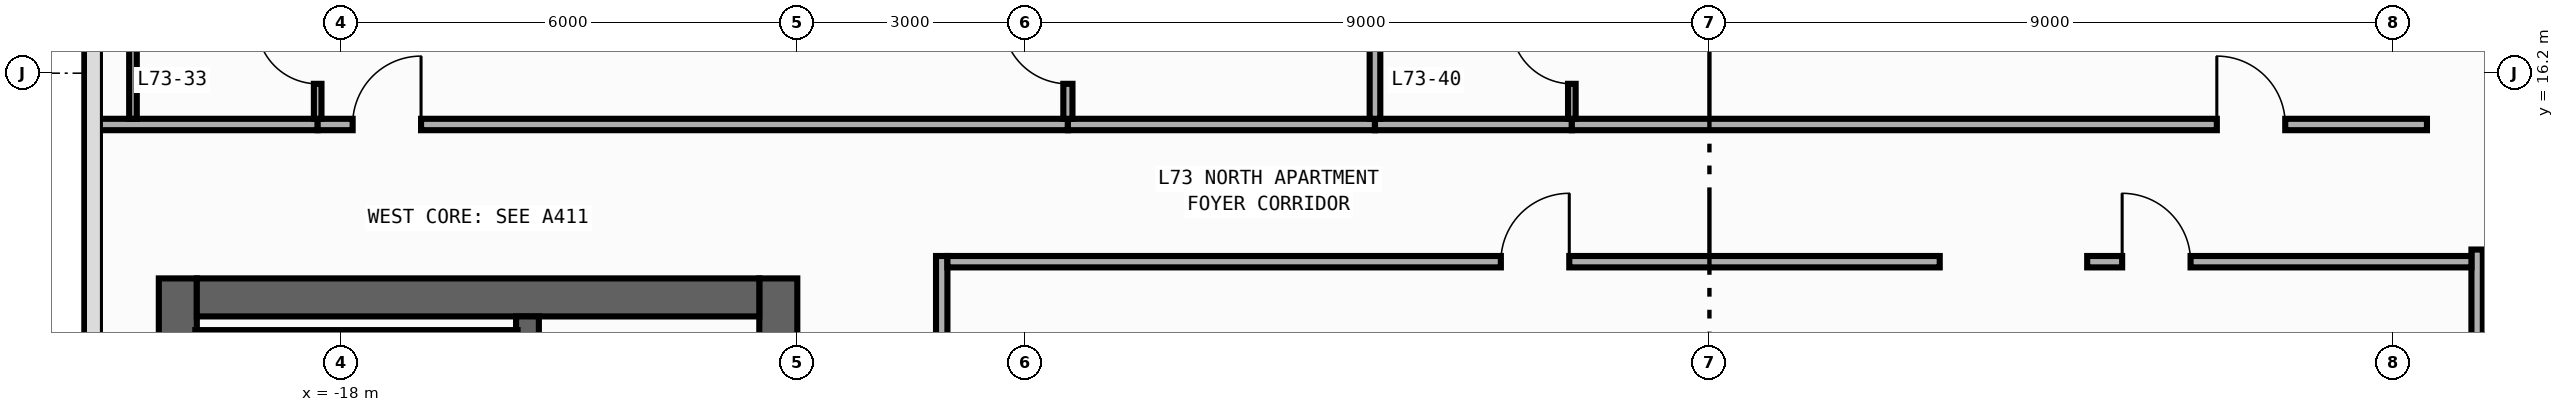
"""IFC4 building model, lengths in metres.
Left out: names, types, materials, properties, quantities, classifications, styles, units other than length and angle.
Written with IfcOpenShell. Run it as: python <this file> out.ifc"""

import sys

from ifc_helpers import new_model, si_unit, direction, frame, frame_2d, origin, place, context, subcontext, project, spatial, rectangle, extrude, element, fill, save


model = new_model("IFC4")
c1 = context("Model", 3, precision=1e-05, world=origin(), true_north=direction((0.0, 1.0)))
c2 = subcontext(c1, "Body", "Model", "MODEL_VIEW")
j1 = project(units=[si_unit("LENGTHUNIT", "METRE"), si_unit("PLANEANGLEUNIT", "RADIAN")], contexts=[c1])
p1 = place(None, origin())
s1 = spatial("IfcSite", under=j1, at=p1, CompositionType="ELEMENT")
p2 = place(p1, origin())
s2 = spatial("IfcBuilding", under=s1, at=p2, CompositionType="ELEMENT")
p3 = place(p2, frame((0.0, 0.0, 304.2)))
s3 = spatial("IfcBuildingStorey", under=s2, at=p3, CompositionType="ELEMENT", Elevation=304.2)
p4 = place(p3, frame((-20.15, -13.5, 0.0), z_axis=(0.0, 0.0, 1.0), x_axis=(0.0, 1.0, 0.0)))
e1 = element("IfcWall", 1, at=p4, inside=s3, PredefinedType="SHEAR", context=c2, shape_type="SweptSolid", body=[
    extrude(rectangle(XDim=27.0, YDim=0.5, at=frame_2d((13.5, 0.0))), origin(), (0.0, 0.0, 1.0), 3.54),
])
p5 = place(p3, frame((-12.25, -13.5, 0.0), z_axis=(0.0, 0.0, 1.0), x_axis=(0.0, 1.0, 0.0)))
e2 = element("IfcWall", 2, at=p5, inside=s3, PredefinedType="SHEAR", context=c2, shape_type="SweptSolid", body=[
    extrude(rectangle(XDim=27.0, YDim=0.5, at=frame_2d((13.5, 0.0))), origin(), (0.0, 0.0, 1.0), 3.54),
])
p6 = place(p5, frame((15.175, 0.0, 0.0)))
e3 = element("IfcOpeningElement", 3, at=p6, cuts=e2, PredefinedType="OPENING", context=c2, shape_type="SweptSolid", body=[
    extrude(rectangle(XDim=0.85, YDim=2.1, at=frame_2d((0.425, 1.05))), frame((0.0, 0.26, 0.0), z_axis=(0.0, -1.0, 0.0), x_axis=(1.0, 0.0, 0.0)), (0.0, 0.0, 1.0), 0.52),
])
p7 = place(p5, frame((21.275, 0.0, 0.0)))
e4 = element("IfcOpeningElement", 4, at=p7, cuts=e2, PredefinedType="OPENING", context=c2, shape_type="SweptSolid", body=[
    extrude(rectangle(XDim=0.85, YDim=2.1, at=frame_2d((0.425, 1.05))), frame((0.0, 0.26, 0.0), z_axis=(0.0, -1.0, 0.0), x_axis=(1.0, 0.0, 0.0)), (0.0, 0.0, 1.0), 0.52),
])
p8 = place(p5, frame((4.275, 0.0, 0.0)))
e5 = element("IfcOpeningElement", 5, at=p8, cuts=e2, PredefinedType="OPENING", context=c2, shape_type="SweptSolid", body=[
    extrude(rectangle(XDim=0.85, YDim=2.1, at=frame_2d((0.425, 1.05))), frame((0.0, 0.26, 0.0), z_axis=(0.0, -1.0, 0.0), x_axis=(1.0, 0.0, 0.0)), (0.0, 0.0, 1.0), 0.52),
])
p9 = place(p5, frame((10.275, 0.0, 0.0)))
e6 = element("IfcOpeningElement", 6, at=p9, cuts=e2, PredefinedType="OPENING", context=c2, shape_type="SweptSolid", body=[
    extrude(rectangle(XDim=0.85, YDim=2.1, at=frame_2d((0.425, 1.05))), frame((0.0, 0.26, 0.0), z_axis=(0.0, -1.0, 0.0), x_axis=(1.0, 0.0, 0.0)), (0.0, 0.0, 1.0), 0.52),
])
p10 = place(p5, frame((12.725, 0.0, 0.0)))
e7 = element("IfcOpeningElement", 7, at=p10, cuts=e2, PredefinedType="OPENING", context=c2, shape_type="SweptSolid", body=[
    extrude(rectangle(XDim=1.15, YDim=2.2, at=frame_2d((0.575, 1.1))), frame((0.0, 0.26, 0.0), z_axis=(0.0, -1.0, 0.0), x_axis=(1.0, 0.0, 0.0)), (0.0, 0.0, 1.0), 0.52),
])
p11 = place(p5, frame((1.625, 0.0, 0.0)))
e8 = element("IfcOpeningElement", 8, at=p11, cuts=e2, PredefinedType="OPENING", context=c2, shape_type="SweptSolid", body=[
    extrude(rectangle(XDim=0.85, YDim=2.1, at=frame_2d((0.425, 1.05))), frame((0.0, 0.26, 0.0), z_axis=(0.0, -1.0, 0.0), x_axis=(1.0, 0.0, 0.0)), (0.0, 0.0, 1.0), 0.52),
])
p12 = place(p3, frame((-19.9, 13.25, 0.0), z_axis=(0.0, 0.0, 1.0), x_axis=(1.0, 0.0, 0.0)))
e9 = element("IfcWall", 9, at=p12, inside=s3, PredefinedType="SHEAR", context=c2, shape_type="SweptSolid", body=[
    extrude(rectangle(XDim=7.4, YDim=0.5, at=frame_2d((3.7, 0.0))), origin(), (0.0, 0.0, 1.0), 3.54),
])
p13 = place(p3, frame((-15.55, -13.0, 0.0), z_axis=(0.0, 0.0, 1.0), x_axis=(0.0, 1.0, 0.0)))
e10 = element("IfcWall", 10, at=p13, inside=s3, PredefinedType="SHEAR", context=c2, shape_type="SweptSolid", body=[
    extrude(rectangle(XDim=26.0, YDim=0.3, at=frame_2d((13.0, 0.0))), origin(), (0.0, 0.0, 1.0), 3.54),
])
p14 = place(p13, frame((12.225, 0.0, 0.0)))
e11 = element("IfcOpeningElement", 11, at=p14, cuts=e10, PredefinedType="OPENING", context=c2, shape_type="SweptSolid", body=[
    extrude(rectangle(XDim=1.15, YDim=2.2, at=frame_2d((0.575, 1.1))), frame((0.0, 0.16, 0.0), z_axis=(0.0, -1.0, 0.0), x_axis=(1.0, 0.0, 0.0)), (0.0, 0.0, 1.0), 0.32),
])
p15 = place(p13, frame((1.125, 0.0, 0.0)))
e12 = element("IfcOpeningElement", 12, at=p15, cuts=e10, PredefinedType="OPENING", context=c2, shape_type="SweptSolid", body=[
    extrude(rectangle(XDim=0.85, YDim=2.1, at=frame_2d((0.425, 1.05))), frame((0.0, 0.16, 0.0), z_axis=(0.0, -1.0, 0.0), x_axis=(1.0, 0.0, 0.0)), (0.0, 0.0, 1.0), 0.32),
])
p16 = place(p3, frame((-19.92, 12.71, 0.0), z_axis=(0.0, 0.0, 1.0), x_axis=(1.0, 0.0, 0.0)))
e13 = element("IfcWall", 13, at=p16, inside=s3, PredefinedType="SHEAR", context=c2, shape_type="SweptSolid", body=[
    extrude(rectangle(XDim=4.24, YDim=0.22, at=frame_2d((2.12, 0.0))), origin(), (0.0, 0.0, 1.0), 3.54),
])
p17 = place(p3, frame((-10.1, 4.79, 0.0), z_axis=(0.0, 0.0, 1.0), x_axis=(0.0, 1.0, 0.0)))
e14 = element("IfcWall", 14, at=p17, inside=s3, PredefinedType="PARTITIONING", context=c2, shape_type="SweptSolid", body=[
    extrude(rectangle(XDim=9.005, YDim=0.15, at=frame_2d((4.502, 0.0))), origin(), (0.0, 0.0, 1.0), 3.54),
])
p18 = place(p17, frame((0.46, 0.0, 0.0)))
e15 = element("IfcOpeningElement", 15, at=p18, cuts=e14, PredefinedType="OPENING", context=c2, shape_type="SweptSolid", body=[
    extrude(rectangle(XDim=0.9, YDim=2.15, at=frame_2d((0.45, 1.075))), frame((0.0, 0.085, 0.0), z_axis=(0.0, -1.0, 0.0), x_axis=(1.0, 0.0, 0.0)), (0.0, 0.0, 1.0), 0.17),
])
p19 = place(p3, frame((10.1, 4.79, 0.0), z_axis=(0.0, 0.0, 1.0), x_axis=(0.0, 1.0, 0.0)))
e16 = element("IfcWall", 16, at=p19, inside=s3, PredefinedType="PARTITIONING", context=c2, shape_type="SweptSolid", body=[
    extrude(rectangle(XDim=9.09, YDim=0.15, at=frame_2d((4.545, 0.0))), origin(), (0.0, 0.0, 1.0), 3.54),
])
p20 = place(p19, frame((0.46, 0.0, 0.0)))
e17 = element("IfcOpeningElement", 17, at=p20, cuts=e16, PredefinedType="OPENING", context=c2, shape_type="SweptSolid", body=[
    extrude(rectangle(XDim=0.9, YDim=2.15, at=frame_2d((0.45, 1.075))), frame((0.0, 0.085, 0.0), z_axis=(0.0, -1.0, 0.0), x_axis=(1.0, 0.0, 0.0)), (0.0, 0.0, 1.0), 0.17),
])
p21 = place(p3, frame((-21.255, 15.525, 0.0), z_axis=(0.0, 0.0, 1.0), x_axis=(1.0, 0.0, 0.0)))
e18 = element("IfcWall", 18, at=p21, inside=s3, PredefinedType="PARTITIONING", context=c2, shape_type="SweptSolid", body=[
    extrude(rectangle(XDim=2.945, YDim=0.15, at=frame_2d((1.472, 0.0))), origin(), (0.0, 0.0, 1.0), 3.54),
])
p22 = place(p3, frame((-18.31, 15.525, 0.0), z_axis=(0.0, 0.0, 1.0), x_axis=(1.0, 0.0, 0.0)))
e19 = element("IfcWall", 19, at=p22, inside=s3, PredefinedType="PARTITIONING", context=c2, shape_type="SweptSolid", body=[
    extrude(rectangle(XDim=9.87, YDim=0.15, at=frame_2d((4.935, 0.0))), origin(), (0.0, 0.0, 1.0), 3.54),
])
p23 = place(p22, frame((0.46, 0.0, 0.0)))
e20 = element("IfcOpeningElement", 20, at=p23, cuts=e19, PredefinedType="OPENING", context=c2, shape_type="SweptSolid", body=[
    extrude(rectangle(XDim=0.9, YDim=2.15, at=frame_2d((0.45, 1.075))), frame((0.0, 0.085, 0.0), z_axis=(0.0, -1.0, 0.0), x_axis=(1.0, 0.0, 0.0)), (0.0, 0.0, 1.0), 0.17),
])
p24 = place(p3, frame((-8.44, 15.525, 0.0), z_axis=(0.0, 0.0, 1.0), x_axis=(1.0, 0.0, 0.0)))
e21 = element("IfcWall", 21, at=p24, inside=s3, PredefinedType="PARTITIONING", context=c2, shape_type="SweptSolid", body=[
    extrude(rectangle(XDim=4.04, YDim=0.15, at=frame_2d((2.02, 0.0))), origin(), (0.0, 0.0, 1.0), 3.54),
])
p25 = place(p3, frame((-4.4, 15.525, 0.0), z_axis=(0.0, 0.0, 1.0), x_axis=(1.0, 0.0, 0.0)))
e22 = element("IfcWall", 22, at=p25, inside=s3, PredefinedType="PARTITIONING", context=c2, shape_type="SweptSolid", body=[
    extrude(rectangle(XDim=2.59, YDim=0.15, at=frame_2d((1.295, 0.0))), origin(), (0.0, 0.0, 1.0), 3.54),
])
p26 = place(p3, frame((-1.81, 15.525, 0.0), z_axis=(0.0, 0.0, 1.0), x_axis=(1.0, 0.0, 0.0)))
e23 = element("IfcWall", 23, at=p26, inside=s3, PredefinedType="PARTITIONING", context=c2, shape_type="SweptSolid", body=[
    extrude(rectangle(XDim=11.25, YDim=0.15, at=frame_2d((5.625, 0.0))), origin(), (0.0, 0.0, 1.0), 3.54),
])
p27 = place(p26, frame((8.486, 0.0, 0.0)))
e24 = element("IfcOpeningElement", 24, at=p27, cuts=e23, PredefinedType="OPENING", context=c2, shape_type="SweptSolid", body=[
    extrude(rectangle(XDim=0.9, YDim=2.15, at=frame_2d((0.45, 1.075))), frame((0.0, 0.085, 0.0), z_axis=(0.0, -1.0, 0.0), x_axis=(1.0, 0.0, 0.0)), (0.0, 0.0, 1.0), 0.17),
])
p28 = place(p3, frame((-10.025, 13.72, 0.0), z_axis=(0.0, 0.0, 1.0), x_axis=(1.0, 0.0, 0.0)))
e25 = element("IfcWall", 25, at=p28, inside=s3, PredefinedType="PARTITIONING", context=c2, shape_type="SweptSolid", body=[
    extrude(rectangle(XDim=13.055, YDim=0.15, at=frame_2d((6.527, 0.0))), origin(), (0.0, 0.0, 1.0), 3.54),
])
p29 = place(p28, frame((7.281, 0.0, 0.0)))
e26 = element("IfcOpeningElement", 26, at=p29, cuts=e25, PredefinedType="OPENING", context=c2, shape_type="SweptSolid", body=[
    extrude(rectangle(XDim=0.9, YDim=2.15, at=frame_2d((0.45, 1.075))), frame((0.0, 0.085, 0.0), z_axis=(0.0, -1.0, 0.0), x_axis=(1.0, 0.0, 0.0)), (0.0, 0.0, 1.0), 0.17),
])
p30 = place(p3, frame((4.97, 13.72, 0.0), z_axis=(0.0, 0.0, 1.0), x_axis=(1.0, 0.0, 0.0)))
e27 = element("IfcWall", 27, at=p30, inside=s3, PredefinedType="PARTITIONING", context=c2, shape_type="SweptSolid", body=[
    extrude(rectangle(XDim=5.055, YDim=0.15, at=frame_2d((2.527, 0.0))), origin(), (0.0, 0.0, 1.0), 3.54),
])
p31 = place(p30, frame((0.46, 0.0, 0.0)))
e28 = element("IfcOpeningElement", 28, at=p31, cuts=e27, PredefinedType="OPENING", context=c2, shape_type="SweptSolid", body=[
    extrude(rectangle(XDim=0.9, YDim=2.15, at=frame_2d((0.45, 1.075))), frame((0.0, 0.085, 0.0), z_axis=(0.0, -1.0, 0.0), x_axis=(1.0, 0.0, 0.0)), (0.0, 0.0, 1.0), 0.17),
])
p32 = place(p3, frame((-18.31, 15.6, 0.0), z_axis=(0.0, 0.0, 1.0), x_axis=(0.0, 1.0, 0.0)))
e29 = element("IfcWall", 29, at=p32, inside=s3, PredefinedType="PARTITIONING", context=c2, shape_type="SweptSolid", body=[
    extrude(rectangle(XDim=2.5, YDim=0.1, at=frame_2d((1.25, 0.0))), origin(), (0.0, 0.0, 1.0), 3.54),
])
p33 = place(p32, frame((0.46, 0.0, 0.0)))
e30 = element("IfcOpeningElement", 30, at=p33, cuts=e29, PredefinedType="OPENING", context=c2, shape_type="SweptSolid", body=[
    extrude(rectangle(XDim=0.8, YDim=2.1, at=frame_2d((0.4, 1.05))), frame((0.0, 0.06, 0.0), z_axis=(0.0, -1.0, 0.0), x_axis=(1.0, 0.0, 0.0)), (0.0, 0.0, 1.0), 0.12),
])
p34 = place(p3, frame((-8.44, 15.6, 0.0), z_axis=(0.0, 0.0, 1.0), x_axis=(0.0, 1.0, 0.0)))
e31 = element("IfcWall", 31, at=p34, inside=s3, PredefinedType="PARTITIONING", context=c2, shape_type="SweptSolid", body=[
    extrude(rectangle(XDim=4.5, YDim=0.12, at=frame_2d((2.25, 0.0))), origin(), (0.0, 0.0, 1.0), 3.54),
])
p35 = place(p34, frame((0.46, 0.0, 0.0)))
e32 = element("IfcOpeningElement", 32, at=p35, cuts=e31, PredefinedType="OPENING", context=c2, shape_type="SweptSolid", body=[
    extrude(rectangle(XDim=0.86, YDim=2.15, at=frame_2d((0.43, 1.075))), frame((0.0, 0.07, 0.0), z_axis=(0.0, -1.0, 0.0), x_axis=(1.0, 0.0, 0.0)), (0.0, 0.0, 1.0), 0.14),
])
p36 = place(p3, frame((-4.4, 15.6, 0.0), z_axis=(0.0, 0.0, 1.0), x_axis=(0.0, 1.0, 0.0)))
e33 = element("IfcWall", 33, at=p36, inside=s3, PredefinedType="PARTITIONING", context=c2, shape_type="SweptSolid", body=[
    extrude(rectangle(XDim=2.5, YDim=0.14, at=frame_2d((1.25, 0.0))), origin(), (0.0, 0.0, 1.0), 3.54),
])
p37 = place(p3, frame((-1.81, 15.6, 0.0), z_axis=(0.0, 0.0, 1.0), x_axis=(0.0, 1.0, 0.0)))
e34 = element("IfcWall", 34, at=p37, inside=s3, PredefinedType="PARTITIONING", context=c2, shape_type="SweptSolid", body=[
    extrude(rectangle(XDim=2.5, YDim=0.1, at=frame_2d((1.25, 0.0))), origin(), (0.0, 0.0, 1.0), 3.54),
])
p38 = place(p37, frame((0.46, 0.0, 0.0)))
e35 = element("IfcOpeningElement", 35, at=p38, cuts=e34, PredefinedType="OPENING", context=c2, shape_type="SweptSolid", body=[
    extrude(rectangle(XDim=0.8, YDim=2.1, at=frame_2d((0.4, 1.05))), frame((0.0, 0.06, 0.0), z_axis=(0.0, -1.0, 0.0), x_axis=(1.0, 0.0, 0.0)), (0.0, 0.0, 1.0), 0.12),
])
p39 = place(p3, frame((-20.74, 15.6, 0.0), z_axis=(0.0, 0.0, 1.0), x_axis=(0.0, 1.0, 0.0)))
e36 = element("IfcWall", 36, at=p39, inside=s3, PredefinedType="PARTITIONING", context=c2, shape_type="SweptSolid", body=[
    extrude(rectangle(XDim=2.45, YDim=0.1, at=frame_2d((1.225, 0.0))), origin(), (0.0, 0.0, 1.0), 3.54),
])
p40 = place(p23, origin())
e37 = element("IfcDoor", 37, at=p40, inside=s3, OperationType="SINGLE_SWING_RIGHT", PredefinedType="DOOR", context=c2, shape_type="SweptSolid", body=[
    extrude(rectangle(XDim=0.9, YDim=2.15, at=frame_2d((0.45, 1.075))), frame((0.0, 0.025, 0.0), z_axis=(0.0, -1.0, 0.0), x_axis=(1.0, 0.0, 0.0)), (0.0, 0.0, 1.0), 0.05),
])
fill(e20, e37)
p41 = place(p27, origin())
e38 = element("IfcDoor", 38, at=p41, inside=s3, OperationType="SINGLE_SWING_LEFT", PredefinedType="DOOR", context=c2, shape_type="SweptSolid", body=[
    extrude(rectangle(XDim=0.9, YDim=2.15, at=frame_2d((0.45, 1.075))), frame((0.0, 0.025, 0.0), z_axis=(0.0, -1.0, 0.0), x_axis=(1.0, 0.0, 0.0)), (0.0, 0.0, 1.0), 0.05),
])
fill(e24, e38)
p42 = place(p29, origin())
e39 = element("IfcDoor", 39, at=p42, inside=s3, OperationType="SINGLE_SWING_RIGHT", PredefinedType="DOOR", context=c2, shape_type="SweptSolid", body=[
    extrude(rectangle(XDim=0.9, YDim=2.15, at=frame_2d((0.45, 1.075))), frame((0.0, 0.025, 0.0), z_axis=(0.0, -1.0, 0.0), x_axis=(1.0, 0.0, 0.0)), (0.0, 0.0, 1.0), 0.05),
])
fill(e26, e39)
p43 = place(p31, origin())
e40 = element("IfcDoor", 40, at=p43, inside=s3, OperationType="SINGLE_SWING_LEFT", PredefinedType="DOOR", context=c2, shape_type="SweptSolid", body=[
    extrude(rectangle(XDim=0.9, YDim=2.15, at=frame_2d((0.45, 1.075))), frame((0.0, 0.025, 0.0), z_axis=(0.0, -1.0, 0.0), x_axis=(1.0, 0.0, 0.0)), (0.0, 0.0, 1.0), 0.05),
])
fill(e28, e40)
p44 = place(p33, origin())
e41 = element("IfcDoor", 41, at=p44, inside=s3, OperationType="SINGLE_SWING_RIGHT", PredefinedType="DOOR", context=c2, shape_type="SweptSolid", body=[
    extrude(rectangle(XDim=0.8, YDim=2.1, at=frame_2d((0.4, 1.05))), frame((0.0, 0.025, 0.0), z_axis=(0.0, -1.0, 0.0), x_axis=(1.0, 0.0, 0.0)), (0.0, 0.0, 1.0), 0.05),
])
fill(e30, e41)
p45 = place(p35, origin())
e42 = element("IfcDoor", 42, at=p45, inside=s3, OperationType="SINGLE_SWING_RIGHT", PredefinedType="DOOR", context=c2, shape_type="SweptSolid", body=[
    extrude(rectangle(XDim=0.86, YDim=2.15, at=frame_2d((0.43, 1.075))), frame((0.0, 0.025, 0.0), z_axis=(0.0, -1.0, 0.0), x_axis=(1.0, 0.0, 0.0)), (0.0, 0.0, 1.0), 0.05),
])
fill(e32, e42)
p46 = place(p38, origin())
e43 = element("IfcDoor", 43, at=p46, inside=s3, OperationType="SINGLE_SWING_RIGHT", PredefinedType="DOOR", context=c2, shape_type="SweptSolid", body=[
    extrude(rectangle(XDim=0.8, YDim=2.1, at=frame_2d((0.4, 1.05))), frame((0.0, 0.025, 0.0), z_axis=(0.0, -1.0, 0.0), x_axis=(1.0, 0.0, 0.0)), (0.0, 0.0, 1.0), 0.05),
])
fill(e35, e43)
save(model, sys.argv[1])
